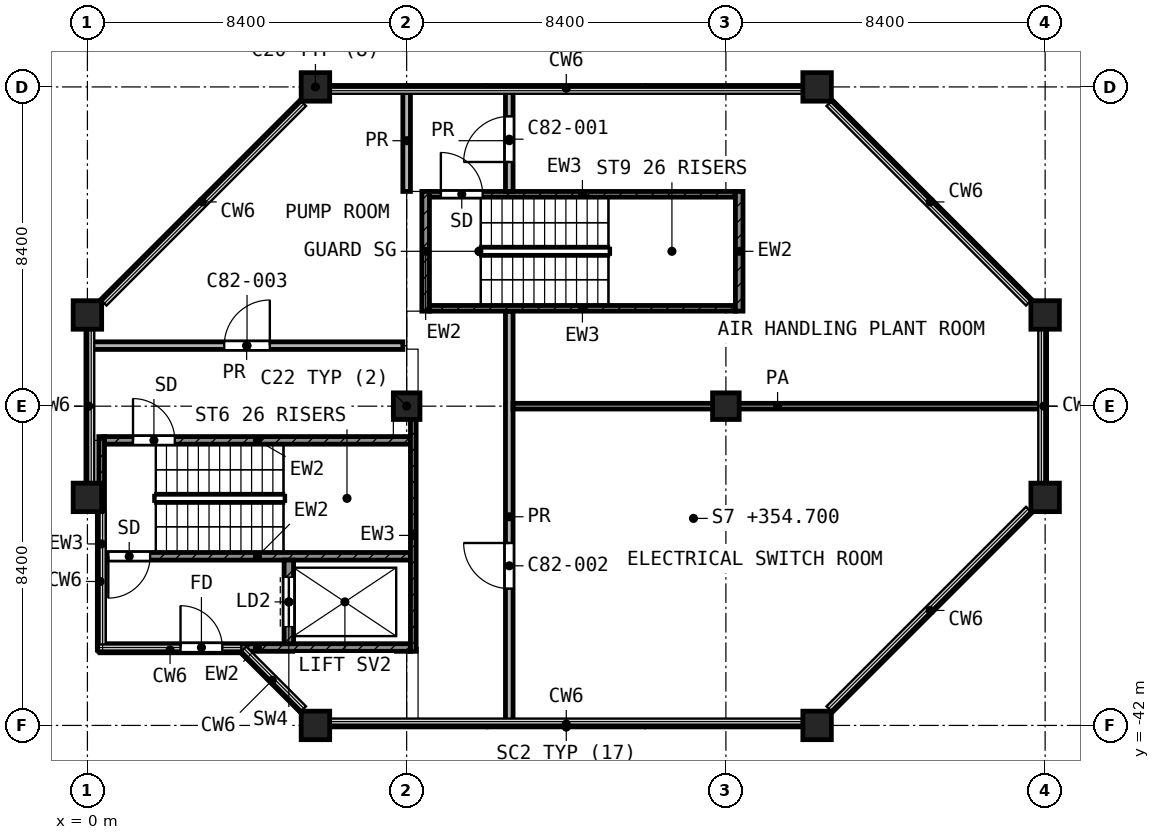
"""IFC4 building model, lengths in metres.
Left out: names, types, materials, properties, quantities, classifications, styles, units other than length and angle.
Written with IfcOpenShell. Run it as: python <this file> out.ifc"""

import sys

from ifc_helpers import new_model, si_unit, direction, frame, frame_2d, origin, origin_2d, place, context, subcontext, project, spatial, rectangle, extrude, element, fill, save


model = new_model("IFC4")
c1 = context("Model", 3, precision=1e-05, world=origin(), true_north=direction((0.0, 1.0)))
c2 = subcontext(c1, "Body", "Model", "MODEL_VIEW")
j1 = project(units=[si_unit("LENGTHUNIT", "METRE"), si_unit("PLANEANGLEUNIT", "RADIAN")], contexts=[c1])
p1 = place(None, origin())
s1 = spatial("IfcSite", under=j1, at=p1, CompositionType="ELEMENT")
p2 = place(p1, origin())
s2 = spatial("IfcBuilding", under=s1, at=p2, CompositionType="ELEMENT")
p3 = place(p2, frame((0.0, 0.0, 354.7)))
s3 = spatial("IfcBuildingStorey", under=s2, at=p3, CompositionType="ELEMENT", Elevation=354.7)
for number, where, z_axis, x_axis in (
    (1, (6.0, -25.2, 0.0), (0.0, 0.0, 1.0), (1.0, 0.0, 0.0)),
    (2, (19.2, -25.2, 0.0), (0.0, 0.0, 1.0), (1.0, 0.0, 0.0)),
    (3, (0.0, -31.2, 0.0), (0.0, 0.0, 1.0), (1.0, 0.0, 0.0)),
    (4, (25.2, -31.2, 0.0), (0.0, 0.0, 1.0), (1.0, 0.0, 0.0)),
):
    element("IfcColumn", number, at=place(p3, frame(where, z_axis=z_axis, x_axis=x_axis)), inside=s3, PredefinedType="COLUMN", context=c2, shape_type="SweptSolid", body=[
        extrude(rectangle(XDim=0.75, YDim=0.75, at=origin_2d()), origin(), (0.0, 0.0, 1.0), 4.5),
    ])
for number, where, z_axis, x_axis in (
    (5, (8.4, -33.6, 0.0), (0.0, 0.0, 1.0), (1.0, 0.0, 0.0)),
    (6, (16.8, -33.6, 0.0), (0.0, 0.0, 1.0), (1.0, 0.0, 0.0)),
):
    element("IfcColumn", number, at=place(p3, frame(where, z_axis=z_axis, x_axis=x_axis)), inside=s3, PredefinedType="COLUMN", context=c2, shape_type="SweptSolid", body=[
        extrude(rectangle(XDim=0.7, YDim=0.7, at=origin_2d()), origin(), (0.0, 0.0, 1.0), 4.5),
    ])
for number, where, z_axis, x_axis in (
    (7, (0.0, -36.0, 0.0), (0.0, 0.0, 1.0), (1.0, 0.0, 0.0)),
    (8, (25.2, -36.0, 0.0), (0.0, 0.0, 1.0), (1.0, 0.0, 0.0)),
    (9, (6.0, -42.0, 0.0), (0.0, 0.0, 1.0), (1.0, 0.0, 0.0)),
    (10, (19.2, -42.0, 0.0), (0.0, 0.0, 1.0), (1.0, 0.0, 0.0)),
):
    element("IfcColumn", number, at=place(p3, frame(where, z_axis=z_axis, x_axis=x_axis)), inside=s3, PredefinedType="COLUMN", context=c2, shape_type="SweptSolid", body=[
        extrude(rectangle(XDim=0.75, YDim=0.75, at=origin_2d()), origin(), (0.0, 0.0, 1.0), 4.5),
    ])
p4 = place(p3, frame((0.375, -40.05, 0.0), z_axis=(0.0, 0.0, 1.0), x_axis=(0.0, 1.0, 0.0)))
e11 = element("IfcWall", 11, at=p4, inside=s3, PredefinedType="SHEAR", context=c2, shape_type="SweptSolid", body=[
    extrude(rectangle(XDim=5.65, YDim=0.15, at=frame_2d((2.825, 0.0))), origin(), (0.0, 0.0, 1.0), 4.2),
])
p5 = place(p3, frame((8.575, -40.05, 0.0), z_axis=(0.0, 0.0, 1.0), x_axis=(0.0, 1.0, 0.0)))
e12 = element("IfcWall", 12, at=p5, inside=s3, PredefinedType="SHEAR", context=c2, shape_type="SweptSolid", body=[
    extrude(rectangle(XDim=6.1, YDim=0.15, at=frame_2d((3.05, 0.0))), origin(), (0.0, 0.0, 1.0), 4.2),
])
p6 = place(p3, frame((0.45, -34.5, 0.0), z_axis=(0.0, 0.0, 1.0), x_axis=(1.0, 0.0, 0.0)))
e13 = element("IfcWall", 13, at=p6, inside=s3, PredefinedType="SHEAR", context=c2, shape_type="SweptSolid", body=[
    extrude(rectangle(XDim=8.05, YDim=0.2, at=frame_2d((4.025, 0.0))), origin(), (0.0, 0.0, 1.0), 4.2),
])
p7 = place(p6, frame((0.75, 0.0, 0.0)))
e14 = element("IfcOpeningElement", 14, at=p7, cuts=e13, PredefinedType="OPENING", context=c2, shape_type="SweptSolid", body=[
    extrude(rectangle(XDim=1.1, YDim=2.1, at=frame_2d((0.55, 1.05))), frame((0.0, 0.11, 0.0), z_axis=(0.0, -1.0, 0.0), x_axis=(1.0, 0.0, 0.0)), (0.0, 0.0, 1.0), 0.22),
])
p8 = place(p3, frame((0.45, -37.55, 0.0), z_axis=(0.0, 0.0, 1.0), x_axis=(1.0, 0.0, 0.0)))
e15 = element("IfcWall", 15, at=p8, inside=s3, PredefinedType="SHEAR", context=c2, shape_type="SweptSolid", body=[
    extrude(rectangle(XDim=8.05, YDim=0.2, at=frame_2d((4.025, 0.0))), origin(), (0.0, 0.0, 1.0), 4.2),
])
p9 = place(p8, frame((0.1, 0.0, 0.0)))
e16 = element("IfcOpeningElement", 16, at=p9, cuts=e15, PredefinedType="OPENING", context=c2, shape_type="SweptSolid", body=[
    extrude(rectangle(XDim=1.1, YDim=2.1, at=frame_2d((0.55, 1.05))), frame((0.0, 0.11, 0.0), z_axis=(0.0, -1.0, 0.0), x_axis=(1.0, 0.0, 0.0)), (0.0, 0.0, 1.0), 0.22),
])
p10 = place(p3, frame((0.45, -39.95, 0.0), z_axis=(0.0, 0.0, 1.0), x_axis=(1.0, 0.0, 0.0)))
e17 = element("IfcWall", 17, at=p10, inside=s3, PredefinedType="SHEAR", context=c2, shape_type="SweptSolid", body=[
    extrude(rectangle(XDim=8.05, YDim=0.2, at=frame_2d((4.025, 0.0))), origin(), (0.0, 0.0, 1.0), 4.2),
])
p11 = place(p10, frame((2.0, 0.0, 0.0)))
e18 = element("IfcOpeningElement", 18, at=p11, cuts=e17, PredefinedType="OPENING", context=c2, shape_type="SweptSolid", body=[
    extrude(rectangle(XDim=1.1, YDim=2.1, at=frame_2d((0.55, 1.05))), frame((0.0, 0.11, 0.0), z_axis=(0.0, -1.0, 0.0), x_axis=(1.0, 0.0, 0.0)), (0.0, 0.0, 1.0), 0.22),
])
p12 = place(p3, frame((5.3, -39.85, 0.0), z_axis=(0.0, 0.0, 1.0), x_axis=(0.0, 1.0, 0.0)))
e19 = element("IfcWall", 19, at=p12, inside=s3, PredefinedType="SHEAR", context=c2, shape_type="SweptSolid", body=[
    extrude(rectangle(XDim=2.2, YDim=0.25, at=frame_2d((1.1, 0.0))), origin(), (0.0, 0.0, 1.0), 4.2),
])
p13 = place(p12, frame((0.45, 0.0, 0.0)))
e20 = element("IfcOpeningElement", 20, at=p13, cuts=e19, PredefinedType="OPENING", context=c2, shape_type="SweptSolid", body=[
    extrude(rectangle(XDim=1.3, YDim=2.1, at=frame_2d((0.65, 1.05))), frame((0.0, 0.135, 0.0), z_axis=(0.0, -1.0, 0.0), x_axis=(1.0, 0.0, 0.0)), (0.0, 0.0, 1.0), 0.27),
])
for number, where, z_axis, x_axis in (
    (21, (8.9, -31.1, 0.0), (0.0, 0.0, 1.0), (0.0, 1.0, 0.0)),
    (22, (17.15, -31.1, 0.0), (0.0, 0.0, 1.0), (0.0, 1.0, 0.0)),
):
    element("IfcWall", number, at=place(p3, frame(where, z_axis=z_axis, x_axis=x_axis)), inside=s3, PredefinedType="SHEAR", context=c2, shape_type="SweptSolid", body=[
        extrude(rectangle(XDim=3.15, YDim=0.2, at=frame_2d((1.575, 0.0))), origin(), (0.0, 0.0, 1.0), 4.2),
    ])
p14 = place(p3, frame((9.0, -28.025, 0.0), z_axis=(0.0, 0.0, 1.0), x_axis=(1.0, 0.0, 0.0)))
e23 = element("IfcWall", 23, at=p14, inside=s3, PredefinedType="SHEAR", context=c2, shape_type="SweptSolid", body=[
    extrude(rectangle(XDim=8.05, YDim=0.15, at=frame_2d((4.025, 0.0))), origin(), (0.0, 0.0, 1.0), 4.2),
])
p15 = place(p14, frame((0.3, 0.0, 0.0)))
e24 = element("IfcOpeningElement", 24, at=p15, cuts=e23, PredefinedType="OPENING", context=c2, shape_type="SweptSolid", body=[
    extrude(rectangle(XDim=1.1, YDim=2.1, at=frame_2d((0.55, 1.05))), frame((0.0, 0.085, 0.0), z_axis=(0.0, -1.0, 0.0), x_axis=(1.0, 0.0, 0.0)), (0.0, 0.0, 1.0), 0.17),
])
p16 = place(p3, frame((9.0, -31.025, 0.0), z_axis=(0.0, 0.0, 1.0), x_axis=(1.0, 0.0, 0.0)))
e25 = element("IfcWall", 25, at=p16, inside=s3, PredefinedType="SHEAR", context=c2, shape_type="SweptSolid", body=[
    extrude(rectangle(XDim=8.05, YDim=0.15, at=frame_2d((4.025, 0.0))), origin(), (0.0, 0.0, 1.0), 4.2),
])
p17 = place(p3, frame((11.2, -33.6, 0.0), z_axis=(0.0, 0.0, 1.0), x_axis=(1.0, 0.0, 0.0)))
e26 = element("IfcWall", 26, at=p17, inside=s3, PredefinedType="PARTITIONING", context=c2, shape_type="SweptSolid", body=[
    extrude(rectangle(XDim=13.92, YDim=0.15, at=frame_2d((6.96, 0.0))), origin(), (0.0, 0.0, 1.0), 4.2),
])
p18 = place(p3, frame((0.08, -32.007, 0.0), z_axis=(0.0, 0.0, 1.0), x_axis=(1.0, 0.0, 0.0)))
e27 = element("IfcWall", 27, at=p18, inside=s3, PredefinedType="PARTITIONING", context=c2, shape_type="SweptSolid", body=[
    extrude(rectangle(XDim=8.22, YDim=0.2, at=frame_2d((4.11, 0.0))), origin(), (0.0, 0.0, 1.0), 4.2),
])
p19 = place(p18, frame((3.52, 0.0, 0.0)))
e28 = element("IfcOpeningElement", 28, at=p19, cuts=e27, PredefinedType="OPENING", context=c2, shape_type="SweptSolid", body=[
    extrude(rectangle(XDim=1.2, YDim=2.1, at=frame_2d((0.6, 1.05))), frame((0.0, 0.11, 0.0), z_axis=(0.0, -1.0, 0.0), x_axis=(1.0, 0.0, 0.0)), (0.0, 0.0, 1.0), 0.22),
])
p20 = place(p3, frame((8.4, -27.95, 0.0), z_axis=(0.0, 0.0, 1.0), x_axis=(0.0, 1.0, 0.0)))
e29 = element("IfcWall", 29, at=p20, inside=s3, PredefinedType="PARTITIONING", context=c2, shape_type="SweptSolid", body=[
    extrude(rectangle(XDim=2.67, YDim=0.2, at=frame_2d((1.335, 0.0))), origin(), (0.0, 0.0, 1.0), 4.2),
])
p21 = place(p3, frame((11.1, -41.92, 0.0), z_axis=(0.0, 0.0, 1.0), x_axis=(0.0, 1.0, 0.0)))
e30 = element("IfcWall", 30, at=p21, inside=s3, PredefinedType="PARTITIONING", context=c2, shape_type="SweptSolid", body=[
    extrude(rectangle(XDim=10.82, YDim=0.2, at=frame_2d((5.41, 0.0))), origin(), (0.0, 0.0, 1.0), 4.2),
])
p22 = place(p21, frame((3.52, 0.0, 0.0)))
e31 = element("IfcOpeningElement", 31, at=p22, cuts=e30, PredefinedType="OPENING", context=c2, shape_type="SweptSolid", body=[
    extrude(rectangle(XDim=1.2, YDim=2.1, at=frame_2d((0.6, 1.05))), frame((0.0, 0.11, 0.0), z_axis=(0.0, -1.0, 0.0), x_axis=(1.0, 0.0, 0.0)), (0.0, 0.0, 1.0), 0.22),
])
p23 = place(p3, frame((11.1, -27.95, 0.0), z_axis=(0.0, 0.0, 1.0), x_axis=(0.0, 1.0, 0.0)))
e32 = element("IfcWall", 32, at=p23, inside=s3, PredefinedType="PARTITIONING", context=c2, shape_type="SweptSolid", body=[
    extrude(rectangle(XDim=2.67, YDim=0.2, at=frame_2d((1.335, 0.0))), origin(), (0.0, 0.0, 1.0), 4.2),
])
p24 = place(p23, frame((0.775, 0.0, 0.0)))
e33 = element("IfcOpeningElement", 33, at=p24, cuts=e32, PredefinedType="OPENING", context=c2, shape_type="SweptSolid", body=[
    extrude(rectangle(XDim=1.2, YDim=2.1, at=frame_2d((0.6, 1.05))), frame((0.0, 0.11, 0.0), z_axis=(0.0, -1.0, 0.0), x_axis=(1.0, 0.0, 0.0)), (0.0, 0.0, 1.0), 0.22),
])
p25 = place(p7, origin())
e34 = element("IfcDoor", 34, at=p25, inside=s3, OperationType="SINGLE_SWING_LEFT", PredefinedType="DOOR", context=c2, shape_type="SweptSolid", body=[
    extrude(rectangle(XDim=1.1, YDim=2.1, at=frame_2d((0.55, 1.05))), frame((0.0, 0.025, 0.0), z_axis=(0.0, -1.0, 0.0), x_axis=(1.0, 0.0, 0.0)), (0.0, 0.0, 1.0), 0.05),
])
fill(e14, e34)
p26 = place(p9, frame((1.1, 0.0, 0.0), z_axis=(0.0, 0.0, 1.0), x_axis=(-1.0, 0.0, 0.0)))
e35 = element("IfcDoor", 35, at=p26, inside=s3, OperationType="SINGLE_SWING_LEFT", PredefinedType="DOOR", context=c2, shape_type="SweptSolid", body=[
    extrude(rectangle(XDim=1.1, YDim=2.1, at=frame_2d((0.55, 1.05))), frame((0.0, 0.025, 0.0), z_axis=(0.0, -1.0, 0.0), x_axis=(1.0, 0.0, 0.0)), (0.0, 0.0, 1.0), 0.05),
])
fill(e16, e35)
p27 = place(p13, origin())
e36 = element("IfcDoor", 36, at=p27, inside=s3, OperationType="DOUBLE_DOOR_SLIDING", PredefinedType="DOOR", context=c2, shape_type="SweptSolid", body=[
    extrude(rectangle(XDim=1.3, YDim=2.1, at=frame_2d((0.65, 1.05))), frame((0.0, 0.025, 0.0), z_axis=(0.0, -1.0, 0.0), x_axis=(1.0, 0.0, 0.0)), (0.0, 0.0, 1.0), 0.05),
])
fill(e20, e36)
p28 = place(p11, origin())
e37 = element("IfcDoor", 37, at=p28, inside=s3, OperationType="SINGLE_SWING_LEFT", PredefinedType="DOOR", context=c2, shape_type="SweptSolid", body=[
    extrude(rectangle(XDim=1.1, YDim=2.1, at=frame_2d((0.55, 1.05))), frame((0.0, 0.025, 0.0), z_axis=(0.0, -1.0, 0.0), x_axis=(1.0, 0.0, 0.0)), (0.0, 0.0, 1.0), 0.05),
])
fill(e18, e37)
p29 = place(p15, origin())
e38 = element("IfcDoor", 38, at=p29, inside=s3, OperationType="SINGLE_SWING_LEFT", PredefinedType="DOOR", context=c2, shape_type="SweptSolid", body=[
    extrude(rectangle(XDim=1.1, YDim=2.1, at=frame_2d((0.55, 1.05))), frame((0.0, 0.025, 0.0), z_axis=(0.0, -1.0, 0.0), x_axis=(1.0, 0.0, 0.0)), (0.0, 0.0, 1.0), 0.05),
])
fill(e24, e38)
p30 = place(p24, origin())
e39 = element("IfcDoor", 39, at=p30, inside=s3, OperationType="SINGLE_SWING_LEFT", PredefinedType="DOOR", context=c2, shape_type="SweptSolid", body=[
    extrude(rectangle(XDim=1.2, YDim=2.1, at=frame_2d((0.6, 1.05))), frame((0.0, 0.025, 0.0), z_axis=(0.0, -1.0, 0.0), x_axis=(1.0, 0.0, 0.0)), (0.0, 0.0, 1.0), 0.05),
])
fill(e33, e39)
p31 = place(p22, origin())
e40 = element("IfcDoor", 40, at=p31, inside=s3, OperationType="SINGLE_SWING_RIGHT", PredefinedType="DOOR", context=c2, shape_type="SweptSolid", body=[
    extrude(rectangle(XDim=1.2, YDim=2.1, at=frame_2d((0.6, 1.05))), frame((0.0, 0.025, 0.0), z_axis=(0.0, -1.0, 0.0), x_axis=(1.0, 0.0, 0.0)), (0.0, 0.0, 1.0), 0.05),
])
fill(e31, e40)
p32 = place(p19, origin())
e41 = element("IfcDoor", 41, at=p32, inside=s3, OperationType="SINGLE_SWING_RIGHT", PredefinedType="DOOR", context=c2, shape_type="SweptSolid", body=[
    extrude(rectangle(XDim=1.2, YDim=2.1, at=frame_2d((0.6, 1.05))), frame((0.0, 0.025, 0.0), z_axis=(0.0, -1.0, 0.0), x_axis=(1.0, 0.0, 0.0)), (0.0, 0.0, 1.0), 0.05),
])
fill(e28, e41)
save(model, sys.argv[1])
